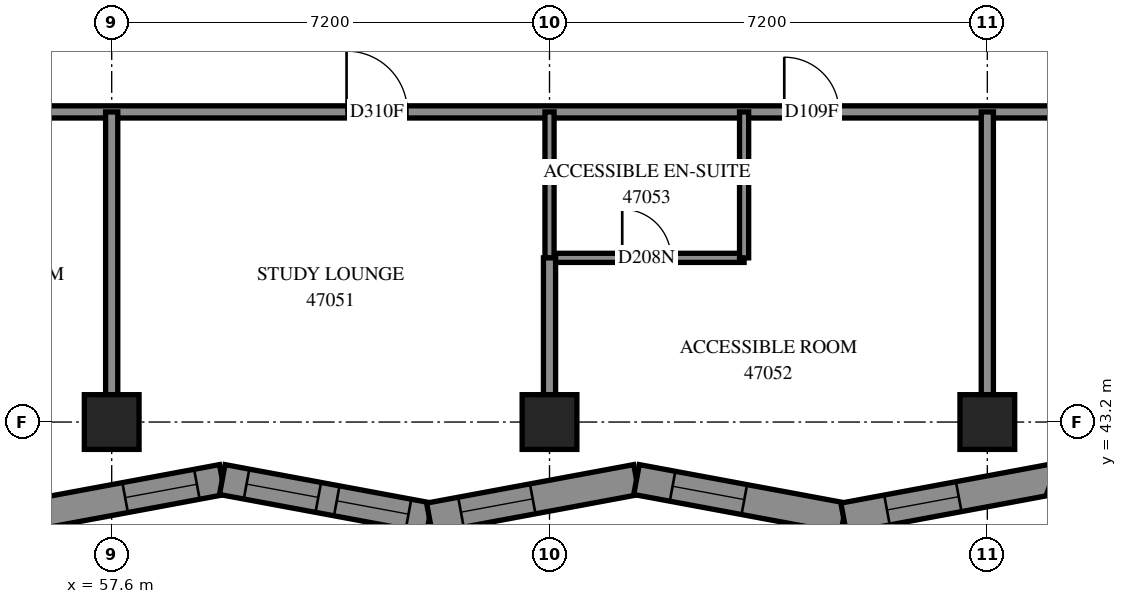
"""IFC4 building model, lengths in metres.
Left out: names, types, materials, properties, quantities, classifications, styles, units other than length and angle.
Written with IfcOpenShell. Run it as: python <this file> out.ifc"""

import sys

from ifc_helpers import new_model, si_unit, direction, frame, frame_2d, origin, origin_2d, place, context, subcontext, project, spatial, polyline, rectangle, outline, extrude, element, fill, save


model = new_model("IFC4")
c1 = context("Model", 3, precision=1e-05, world=origin(), true_north=direction((0.0, 1.0)))
c2 = subcontext(c1, "Body", "Model", "MODEL_VIEW")
j1 = project(units=[si_unit("LENGTHUNIT", "METRE"), si_unit("PLANEANGLEUNIT", "RADIAN")], contexts=[c1])
p1 = place(None, origin())
s1 = spatial("IfcSite", under=j1, at=p1, CompositionType="ELEMENT")
p2 = place(p1, origin())
s2 = spatial("IfcBuilding", under=s1, at=p2, CompositionType="ELEMENT")
p3 = place(p2, frame((0.0, 0.0, 172.8)))
s3 = spatial("IfcBuildingStorey", under=s2, at=p3, CompositionType="ELEMENT", Elevation=172.8)
for number, where, z_axis, x_axis in (
    (1, (57.6, 43.2, 0.0), (0.0, 0.0, 1.0), (1.0, 0.0, 0.0)),
    (2, (64.8, 43.2, 0.0), (0.0, 0.0, 1.0), (1.0, 0.0, 0.0)),
    (3, (72.0, 43.2, 0.0), (0.0, 0.0, 1.0), (1.0, 0.0, 0.0)),
):
    element("IfcColumn", number, at=place(p3, frame(where, z_axis=z_axis, x_axis=x_axis)), inside=s3, PredefinedType="COLUMN", context=c2, shape_type="SweptSolid", body=[
        extrude(rectangle(XDim=0.9, YDim=0.9, at=origin_2d()), origin(), (0.0, 0.0, 1.0), 3.1),
    ])
p4 = place(p3, frame((56.012, 41.621, 0.0), z_axis=(0.0, 0.0, 1.0), x_axis=(0.9831660022, 0.1827145649, 0.0)))
e4 = element("IfcWall", 4, at=p4, inside=s3, PredefinedType="SOLIDWALL", context=c2, shape_type="SweptSolid", body=[
    extrude(outline(polyline([(-0.046, -0.25), (3.418, -0.25), (3.511, 0.25), (0.046, 0.25), (-0.046, -0.25)])), origin(), (0.0, 0.0, 1.0), 3.1),
])
p5 = place(p4, frame((1.84, 0.0, 0.45)))
e5 = element("IfcOpeningElement", 5, at=p5, cuts=e4, PredefinedType="OPENING", context=c2, shape_type="SweptSolid", body=[
    extrude(rectangle(XDim=1.2, YDim=2.5, at=frame_2d((0.6, 1.25))), frame((0.0, 0.26, 0.0), z_axis=(0.0, -1.0, 0.0), x_axis=(1.0, 0.0, 0.0)), (0.0, 0.0, 1.0), 0.52),
])
p6 = place(p3, frame((59.419, 42.254, 0.0), z_axis=(0.0, 0.0, 1.0), x_axis=(0.9831669658, -0.1827093798, 0.0)))
e6 = element("IfcWall", 6, at=p6, inside=s3, PredefinedType="SOLIDWALL", context=c2, shape_type="SweptSolid", body=[
    extrude(outline(polyline([(0.046, -0.25), (3.511, -0.25), (3.418, 0.25), (-0.046, 0.25), (0.046, -0.25)])), origin(), (0.0, 0.0, 1.0), 3.1),
])
p7 = place(p6, frame((0.406, 0.0, 0.45)))
e7 = element("IfcOpeningElement", 7, at=p7, cuts=e6, PredefinedType="OPENING", context=c2, shape_type="SweptSolid", body=[
    extrude(rectangle(XDim=1.2, YDim=2.5, at=frame_2d((0.6, 1.25))), frame((0.0, 0.26, 0.0), z_axis=(0.0, -1.0, 0.0), x_axis=(1.0, 0.0, 0.0)), (0.0, 0.0, 1.0), 0.52),
])
p8 = place(p6, frame((1.915, 0.0, 0.45)))
e8 = element("IfcOpeningElement", 8, at=p8, cuts=e6, PredefinedType="OPENING", context=c2, shape_type="SweptSolid", body=[
    extrude(rectangle(XDim=1.2, YDim=2.5, at=frame_2d((0.6, 1.25))), frame((0.0, 0.26, 0.0), z_axis=(0.0, -1.0, 0.0), x_axis=(1.0, 0.0, 0.0)), (0.0, 0.0, 1.0), 0.52),
])
p9 = place(p3, frame((62.825, 41.621, 0.0), z_axis=(0.0, 0.0, 1.0), x_axis=(0.9831669658, 0.1827093798, 0.0)))
e9 = element("IfcWall", 9, at=p9, inside=s3, PredefinedType="SOLIDWALL", context=c2, shape_type="SweptSolid", body=[
    extrude(outline(polyline([(-0.046, -0.25), (3.418, -0.25), (3.511, 0.25), (0.046, 0.25), (-0.046, -0.25)])), origin(), (0.0, 0.0, 1.0), 3.1),
])
p10 = place(p9, frame((0.528, 0.0, 0.45)))
e10 = element("IfcOpeningElement", 10, at=p10, cuts=e9, PredefinedType="OPENING", context=c2, shape_type="SweptSolid", body=[
    extrude(rectangle(XDim=1.2, YDim=2.5, at=frame_2d((0.6, 1.25))), frame((0.0, 0.26, 0.0), z_axis=(0.0, -1.0, 0.0), x_axis=(1.0, 0.0, 0.0)), (0.0, 0.0, 1.0), 0.52),
])
p11 = place(p3, frame((66.231, 42.254, 0.0), z_axis=(0.0, 0.0, 1.0), x_axis=(0.9831669658, -0.1827093798, 0.0)))
e11 = element("IfcWall", 11, at=p11, inside=s3, PredefinedType="SOLIDWALL", context=c2, shape_type="SweptSolid", body=[
    extrude(outline(polyline([(0.046, -0.25), (3.511, -0.25), (3.418, 0.25), (-0.046, 0.25), (0.046, -0.25)])), origin(), (0.0, 0.0, 1.0), 3.1),
])
p12 = place(p11, frame((0.603, 0.0, 0.45)))
e12 = element("IfcOpeningElement", 12, at=p12, cuts=e11, PredefinedType="OPENING", context=c2, shape_type="SweptSolid", body=[
    extrude(rectangle(XDim=1.2, YDim=2.5, at=frame_2d((0.6, 1.25))), frame((0.0, 0.26, 0.0), z_axis=(0.0, -1.0, 0.0), x_axis=(1.0, 0.0, 0.0)), (0.0, 0.0, 1.0), 0.52),
])
p13 = place(p3, frame((69.637, 41.621, 0.0), z_axis=(0.0, 0.0, 1.0), x_axis=(0.9831680568, 0.1827035087, 0.0)))
e13 = element("IfcWall", 13, at=p13, inside=s3, PredefinedType="SOLIDWALL", context=c2, shape_type="SweptSolid", body=[
    extrude(outline(polyline([(-0.046, -0.25), (3.418, -0.25), (3.554, 0.25), (0.046, 0.25), (-0.046, -0.25)])), origin(), (0.0, 0.0, 1.0), 3.1),
])
p14 = place(p13, frame((0.725, 0.0, 0.45)))
e14 = element("IfcOpeningElement", 14, at=p14, cuts=e13, PredefinedType="OPENING", context=c2, shape_type="SweptSolid", body=[
    extrude(rectangle(XDim=1.2, YDim=2.5, at=frame_2d((0.6, 1.25))), frame((0.0, 0.26, 0.0), z_axis=(0.0, -1.0, 0.0), x_axis=(1.0, 0.0, 0.0)), (0.0, 0.0, 1.0), 0.52),
])
p15 = place(p3, frame((55.5, 48.3, 0.0), z_axis=(0.0, 0.0, 1.0), x_axis=(1.0, 0.0, 0.0)))
e15 = element("IfcWall", 15, at=p15, inside=s3, PredefinedType="PARTITIONING", context=c2, shape_type="SweptSolid", body=[
    extrude(rectangle(XDim=18.974, YDim=0.2, at=frame_2d((9.487, 0.0))), origin(), (0.0, 0.0, 1.0), 3.1),
])
p16 = place(p15, frame((5.963, 0.0, 0.0)))
e16 = element("IfcOpeningElement", 16, at=p16, cuts=e15, PredefinedType="OPENING", context=c2, shape_type="SweptSolid", body=[
    extrude(rectangle(XDim=1.0, YDim=2.1, at=frame_2d((0.5, 1.05))), frame((0.0, 0.11, 0.0), z_axis=(0.0, -1.0, 0.0), x_axis=(1.0, 0.0, 0.0)), (0.0, 0.0, 1.0), 0.22),
])
p17 = place(p15, frame((13.161, 0.0, 0.0)))
e17 = element("IfcOpeningElement", 17, at=p17, cuts=e15, PredefinedType="OPENING", context=c2, shape_type="SweptSolid", body=[
    extrude(rectangle(XDim=0.9, YDim=2.1, at=frame_2d((0.45, 1.05))), frame((0.0, 0.11, 0.0), z_axis=(0.0, -1.0, 0.0), x_axis=(1.0, 0.0, 0.0)), (0.0, 0.0, 1.0), 0.22),
])
for number, where, z_axis, x_axis in (
    (18, (57.6, 43.65, 0.0), (0.0, 0.0, 1.0), (0.0, 1.0, 0.0)),
    (19, (72.0, 43.65, 0.0), (0.0, 0.0, 1.0), (0.0, 1.0, 0.0)),
):
    element("IfcWall", number, at=place(p3, frame(where, z_axis=z_axis, x_axis=x_axis)), inside=s3, PredefinedType="PARTITIONING", context=c2, shape_type="SweptSolid", body=[
        extrude(rectangle(XDim=4.65, YDim=0.2, at=frame_2d((2.325, 0.0))), origin(), (0.0, 0.0, 1.0), 3.1),
    ])
p18 = place(p3, frame((64.8, 45.9, 0.0), z_axis=(0.0, 0.0, 1.0), x_axis=(1.0, 0.0, 0.0)))
e20 = element("IfcWall", 20, at=p18, inside=s3, PredefinedType="PARTITIONING", context=c2, shape_type="SweptSolid", body=[
    extrude(rectangle(XDim=3.2, YDim=0.15, at=frame_2d((1.6, 0.0))), origin(), (0.0, 0.0, 1.0), 3.1),
])
p19 = place(p18, frame((1.196, 0.0, 0.0)))
e21 = element("IfcOpeningElement", 21, at=p19, cuts=e20, PredefinedType="OPENING", context=c2, shape_type="SweptSolid", body=[
    extrude(rectangle(XDim=0.8, YDim=2.1, at=frame_2d((0.4, 1.05))), frame((0.0, 0.085, 0.0), z_axis=(0.0, -1.0, 0.0), x_axis=(1.0, 0.0, 0.0)), (0.0, 0.0, 1.0), 0.17),
])
for number, where, z_axis, x_axis in (
    (22, (68.0, 45.9, 0.0), (0.0, 0.0, 1.0), (0.0, 1.0, 0.0)),
    (23, (64.8, 45.9, 0.0), (0.0, 0.0, 1.0), (0.0, 1.0, 0.0)),
):
    element("IfcWall", number, at=place(p3, frame(where, z_axis=z_axis, x_axis=x_axis)), inside=s3, PredefinedType="PARTITIONING", context=c2, shape_type="SweptSolid", body=[
        extrude(rectangle(XDim=2.4, YDim=0.15, at=frame_2d((1.2, 0.0))), origin(), (0.0, 0.0, 1.0), 3.1),
    ])
p20 = place(p3, frame((64.8, 43.65, 0.0), z_axis=(0.0, 0.0, 1.0), x_axis=(0.0, 1.0, 0.0)))
e24 = element("IfcWall", 24, at=p20, inside=s3, PredefinedType="PARTITIONING", context=c2, shape_type="SweptSolid", body=[
    extrude(rectangle(XDim=2.25, YDim=0.2, at=frame_2d((1.125, 0.0))), origin(), (0.0, 0.0, 1.0), 3.1),
])
p21 = place(p5, origin())
e25 = element("IfcWindow", 25, at=p21, inside=s3, PartitioningType="SINGLE_PANEL", PredefinedType="WINDOW", context=c2, shape_type="SweptSolid", body=[
    extrude(rectangle(XDim=1.2, YDim=2.5, at=frame_2d((0.6, 1.25))), frame((0.0, 0.18, 0.0), z_axis=(0.0, -1.0, 0.0), x_axis=(1.0, 0.0, 0.0)), (0.0, 0.0, 1.0), 0.06),
])
fill(e5, e25)
p22 = place(p7, origin())
e26 = element("IfcWindow", 26, at=p22, inside=s3, PartitioningType="SINGLE_PANEL", PredefinedType="WINDOW", context=c2, shape_type="SweptSolid", body=[
    extrude(rectangle(XDim=1.2, YDim=2.5, at=frame_2d((0.6, 1.25))), frame((0.0, 0.18, 0.0), z_axis=(0.0, -1.0, 0.0), x_axis=(1.0, 0.0, 0.0)), (0.0, 0.0, 1.0), 0.06),
])
fill(e7, e26)
p23 = place(p8, origin())
e27 = element("IfcWindow", 27, at=p23, inside=s3, PartitioningType="SINGLE_PANEL", PredefinedType="WINDOW", context=c2, shape_type="SweptSolid", body=[
    extrude(rectangle(XDim=1.2, YDim=2.5, at=frame_2d((0.6, 1.25))), frame((0.0, 0.18, 0.0), z_axis=(0.0, -1.0, 0.0), x_axis=(1.0, 0.0, 0.0)), (0.0, 0.0, 1.0), 0.06),
])
fill(e8, e27)
p24 = place(p10, origin())
e28 = element("IfcWindow", 28, at=p24, inside=s3, PartitioningType="SINGLE_PANEL", PredefinedType="WINDOW", context=c2, shape_type="SweptSolid", body=[
    extrude(rectangle(XDim=1.2, YDim=2.5, at=frame_2d((0.6, 1.25))), frame((0.0, 0.18, 0.0), z_axis=(0.0, -1.0, 0.0), x_axis=(1.0, 0.0, 0.0)), (0.0, 0.0, 1.0), 0.06),
])
fill(e10, e28)
p25 = place(p12, origin())
e29 = element("IfcWindow", 29, at=p25, inside=s3, PartitioningType="SINGLE_PANEL", PredefinedType="WINDOW", context=c2, shape_type="SweptSolid", body=[
    extrude(rectangle(XDim=1.2, YDim=2.5, at=frame_2d((0.6, 1.25))), frame((0.0, 0.18, 0.0), z_axis=(0.0, -1.0, 0.0), x_axis=(1.0, 0.0, 0.0)), (0.0, 0.0, 1.0), 0.06),
])
fill(e12, e29)
p26 = place(p14, origin())
e30 = element("IfcWindow", 30, at=p26, inside=s3, PartitioningType="SINGLE_PANEL", PredefinedType="WINDOW", context=c2, shape_type="SweptSolid", body=[
    extrude(rectangle(XDim=1.2, YDim=2.5, at=frame_2d((0.6, 1.25))), frame((0.0, 0.18, 0.0), z_axis=(0.0, -1.0, 0.0), x_axis=(1.0, 0.0, 0.0)), (0.0, 0.0, 1.0), 0.06),
])
fill(e14, e30)
p27 = place(p16, origin())
e31 = element("IfcDoor", 31, at=p27, inside=s3, OperationType="SINGLE_SWING_LEFT", PredefinedType="DOOR", context=c2, shape_type="SweptSolid", body=[
    extrude(rectangle(XDim=1.0, YDim=2.1, at=frame_2d((0.5, 1.05))), frame((0.0, 0.025, 0.0), z_axis=(0.0, -1.0, 0.0), x_axis=(1.0, 0.0, 0.0)), (0.0, 0.0, 1.0), 0.05),
])
fill(e16, e31)
p28 = place(p17, origin())
e32 = element("IfcDoor", 32, at=p28, inside=s3, OperationType="SINGLE_SWING_LEFT", PredefinedType="DOOR", context=c2, shape_type="SweptSolid", body=[
    extrude(rectangle(XDim=0.9, YDim=2.1, at=frame_2d((0.45, 1.05))), frame((0.0, 0.025, 0.0), z_axis=(0.0, -1.0, 0.0), x_axis=(1.0, 0.0, 0.0)), (0.0, 0.0, 1.0), 0.05),
])
fill(e17, e32)
p29 = place(p19, origin())
e33 = element("IfcDoor", 33, at=p29, inside=s3, OperationType="SINGLE_SWING_RIGHT", PredefinedType="DOOR", context=c2, shape_type="SweptSolid", body=[
    extrude(rectangle(XDim=0.8, YDim=2.1, at=frame_2d((0.4, 1.05))), frame((0.0, 0.025, 0.0), z_axis=(0.0, -1.0, 0.0), x_axis=(1.0, 0.0, 0.0)), (0.0, 0.0, 1.0), 0.05),
])
fill(e21, e33)
save(model, sys.argv[1])
